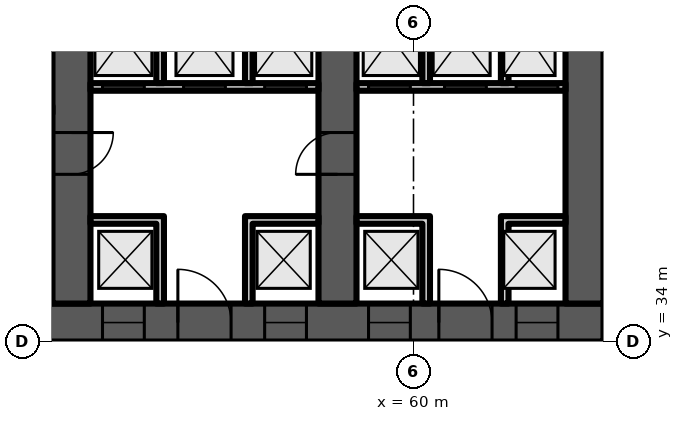
"""IFC4 building model, lengths in metres.
Left out: names, types, materials, properties, quantities, classifications, styles, units other than length and angle.
Written with IfcOpenShell. Run it as: python <this file> out.ifc"""

import sys

from ifc_helpers import new_model, si_unit, direction, frame, frame_2d, origin, place, context, subcontext, project, spatial, polyline, rectangle, outline, extrude, element, fill, save


model = new_model("IFC4")
c1 = context("Model", 3, precision=1e-05, world=origin(), true_north=direction((0.0, 1.0)))
c2 = subcontext(c1, "Body", "Model", "MODEL_VIEW")
j1 = project(units=[si_unit("LENGTHUNIT", "METRE"), si_unit("PLANEANGLEUNIT", "RADIAN")], contexts=[c1])
p1 = place(None, origin())
s1 = spatial("IfcSite", under=j1, at=p1, CompositionType="ELEMENT")
p2 = place(p1, origin())
s2 = spatial("IfcBuilding", under=s1, at=p2, CompositionType="ELEMENT")
p3 = place(p2, frame((0.0, 0.0, 147.1)))
s3 = spatial("IfcBuildingStorey", under=s2, at=p3, CompositionType="ELEMENT", Elevation=147.1)
p4 = place(p3, frame((16.0, 34.5, 0.0), z_axis=(0.0, 0.0, 1.0), x_axis=(1.0, 0.0, 0.0)))
e1 = element("IfcWall", 1, at=p4, inside=s3, PredefinedType="SHEAR", context=c2, shape_type="SweptSolid", body=[
    extrude(rectangle(XDim=49.0, YDim=1.0, at=frame_2d((24.5, 0.0))), origin(), (0.0, 0.0, 1.0), 4.8),
])
p5 = place(p4, frame((1.2, 0.0, 0.0)))
e2 = element("IfcOpeningElement", 2, at=p5, cuts=e1, PredefinedType="OPENING", context=c2, shape_type="SweptSolid", body=[
    extrude(rectangle(XDim=1.1, YDim=2.1, at=frame_2d((0.55, 1.05))), frame((0.0, 0.51, 0.0), z_axis=(0.0, -1.0, 0.0), x_axis=(1.0, 0.0, 0.0)), (0.0, 0.0, 1.0), 1.02),
])
p6 = place(p4, frame((5.083, 0.0, 0.0)))
e3 = element("IfcOpeningElement", 3, at=p6, cuts=e1, PredefinedType="OPENING", context=c2, shape_type="SweptSolid", body=[
    extrude(rectangle(XDim=1.1, YDim=2.1, at=frame_2d((0.55, 1.05))), frame((0.0, 0.51, 0.0), z_axis=(0.0, -1.0, 0.0), x_axis=(1.0, 0.0, 0.0)), (0.0, 0.0, 1.0), 1.02),
])
p7 = place(p4, frame((2.933, 0.0, 0.0)))
e4 = element("IfcOpeningElement", 4, at=p7, cuts=e1, PredefinedType="OPENING", context=c2, shape_type="SweptSolid", body=[
    extrude(rectangle(XDim=1.4, YDim=2.1, at=frame_2d((0.7, 1.05))), frame((0.0, 0.51, 0.0), z_axis=(0.0, -1.0, 0.0), x_axis=(1.0, 0.0, 0.0)), (0.0, 0.0, 1.0), 1.02),
])
p8 = place(p4, frame((7.65, 0.0, 0.0)))
e5 = element("IfcOpeningElement", 5, at=p8, cuts=e1, PredefinedType="OPENING", context=c2, shape_type="SweptSolid", body=[
    extrude(rectangle(XDim=1.2, YDim=2.1, at=frame_2d((0.6, 1.05))), frame((0.0, 0.51, 0.0), z_axis=(0.0, -1.0, 0.0), x_axis=(1.0, 0.0, 0.0)), (0.0, 0.0, 1.0), 1.02),
])
p9 = place(p4, frame((14.817, 0.0, 0.0)))
e6 = element("IfcOpeningElement", 6, at=p9, cuts=e1, PredefinedType="OPENING", context=c2, shape_type="SweptSolid", body=[
    extrude(rectangle(XDim=1.1, YDim=2.1, at=frame_2d((0.55, 1.05))), frame((0.0, 0.51, 0.0), z_axis=(0.0, -1.0, 0.0), x_axis=(1.0, 0.0, 0.0)), (0.0, 0.0, 1.0), 1.02),
])
p10 = place(p4, frame((19.083, 0.0, 0.0)))
e7 = element("IfcOpeningElement", 7, at=p10, cuts=e1, PredefinedType="OPENING", context=c2, shape_type="SweptSolid", body=[
    extrude(rectangle(XDim=1.1, YDim=2.1, at=frame_2d((0.55, 1.05))), frame((0.0, 0.51, 0.0), z_axis=(0.0, -1.0, 0.0), x_axis=(1.0, 0.0, 0.0)), (0.0, 0.0, 1.0), 1.02),
])
p11 = place(p4, frame((16.8, 0.0, 0.0)))
e8 = element("IfcOpeningElement", 8, at=p11, cuts=e1, PredefinedType="OPENING", context=c2, shape_type="SweptSolid", body=[
    extrude(rectangle(XDim=1.4, YDim=2.1, at=frame_2d((0.7, 1.05))), frame((0.0, 0.51, 0.0), z_axis=(0.0, -1.0, 0.0), x_axis=(1.0, 0.0, 0.0)), (0.0, 0.0, 1.0), 1.02),
])
p12 = place(p4, frame((21.817, 0.0, 0.0)))
e9 = element("IfcOpeningElement", 9, at=p12, cuts=e1, PredefinedType="OPENING", context=c2, shape_type="SweptSolid", body=[
    extrude(rectangle(XDim=1.1, YDim=2.1, at=frame_2d((0.55, 1.05))), frame((0.0, 0.51, 0.0), z_axis=(0.0, -1.0, 0.0), x_axis=(1.0, 0.0, 0.0)), (0.0, 0.0, 1.0), 1.02),
])
p13 = place(p4, frame((23.95, 0.0, 0.0)))
e10 = element("IfcOpeningElement", 10, at=p13, cuts=e1, PredefinedType="OPENING", context=c2, shape_type="SweptSolid", body=[
    extrude(rectangle(XDim=1.1, YDim=2.1, at=frame_2d((0.55, 1.05))), frame((0.0, 0.51, 0.0), z_axis=(0.0, -1.0, 0.0), x_axis=(1.0, 0.0, 0.0)), (0.0, 0.0, 1.0), 1.02),
])
p14 = place(p4, frame((26.083, 0.0, 0.0)))
e11 = element("IfcOpeningElement", 11, at=p14, cuts=e1, PredefinedType="OPENING", context=c2, shape_type="SweptSolid", body=[
    extrude(rectangle(XDim=1.1, YDim=2.1, at=frame_2d((0.55, 1.05))), frame((0.0, 0.51, 0.0), z_axis=(0.0, -1.0, 0.0), x_axis=(1.0, 0.0, 0.0)), (0.0, 0.0, 1.0), 1.02),
])
p15 = place(p4, frame((33.15, 0.0, 0.0)))
e12 = element("IfcOpeningElement", 12, at=p15, cuts=e1, PredefinedType="OPENING", context=c2, shape_type="SweptSolid", body=[
    extrude(rectangle(XDim=1.2, YDim=2.1, at=frame_2d((0.6, 1.05))), frame((0.0, 0.51, 0.0), z_axis=(0.0, -1.0, 0.0), x_axis=(1.0, 0.0, 0.0)), (0.0, 0.0, 1.0), 1.02),
])
p16 = place(p4, frame((35.817, 0.0, 0.0)))
e13 = element("IfcOpeningElement", 13, at=p16, cuts=e1, PredefinedType="OPENING", context=c2, shape_type="SweptSolid", body=[
    extrude(rectangle(XDim=1.1, YDim=2.1, at=frame_2d((0.55, 1.05))), frame((0.0, 0.51, 0.0), z_axis=(0.0, -1.0, 0.0), x_axis=(1.0, 0.0, 0.0)), (0.0, 0.0, 1.0), 1.02),
])
p17 = place(p4, frame((40.083, 0.0, 0.0)))
e14 = element("IfcOpeningElement", 14, at=p17, cuts=e1, PredefinedType="OPENING", context=c2, shape_type="SweptSolid", body=[
    extrude(rectangle(XDim=1.1, YDim=2.1, at=frame_2d((0.55, 1.05))), frame((0.0, 0.51, 0.0), z_axis=(0.0, -1.0, 0.0), x_axis=(1.0, 0.0, 0.0)), (0.0, 0.0, 1.0), 1.02),
])
p18 = place(p4, frame((37.8, 0.0, 0.0)))
e15 = element("IfcOpeningElement", 15, at=p18, cuts=e1, PredefinedType="OPENING", context=c2, shape_type="SweptSolid", body=[
    extrude(rectangle(XDim=1.4, YDim=2.1, at=frame_2d((0.7, 1.05))), frame((0.0, 0.51, 0.0), z_axis=(0.0, -1.0, 0.0), x_axis=(1.0, 0.0, 0.0)), (0.0, 0.0, 1.0), 1.02),
])
p19 = place(p4, frame((42.817, 0.0, 0.0)))
e16 = element("IfcOpeningElement", 16, at=p19, cuts=e1, PredefinedType="OPENING", context=c2, shape_type="SweptSolid", body=[
    extrude(rectangle(XDim=1.1, YDim=2.1, at=frame_2d((0.55, 1.05))), frame((0.0, 0.51, 0.0), z_axis=(0.0, -1.0, 0.0), x_axis=(1.0, 0.0, 0.0)), (0.0, 0.0, 1.0), 1.02),
])
p20 = place(p4, frame((46.7, 0.0, 0.0)))
e17 = element("IfcOpeningElement", 17, at=p20, cuts=e1, PredefinedType="OPENING", context=c2, shape_type="SweptSolid", body=[
    extrude(rectangle(XDim=1.1, YDim=2.1, at=frame_2d((0.55, 1.05))), frame((0.0, 0.51, 0.0), z_axis=(0.0, -1.0, 0.0), x_axis=(1.0, 0.0, 0.0)), (0.0, 0.0, 1.0), 1.02),
])
p21 = place(p4, frame((44.667, 0.0, 0.0)))
e18 = element("IfcOpeningElement", 18, at=p21, cuts=e1, PredefinedType="OPENING", context=c2, shape_type="SweptSolid", body=[
    extrude(rectangle(XDim=1.4, YDim=2.1, at=frame_2d((0.7, 1.05))), frame((0.0, 0.51, 0.0), z_axis=(0.0, -1.0, 0.0), x_axis=(1.0, 0.0, 0.0)), (0.0, 0.0, 1.0), 1.02),
])
p22 = place(p3, frame((51.0, 35.0, 0.0), z_axis=(0.0, 0.0, 1.0), x_axis=(0.0, 1.0, 0.0)))
e19 = element("IfcWall", 19, at=p22, inside=s3, PredefinedType="SHEAR", context=c2, shape_type="SweptSolid", body=[
    extrude(rectangle(XDim=13.965, YDim=1.0, at=frame_2d((6.982, 0.0))), origin(), (0.0, 0.0, 1.0), 4.8),
])
p23 = place(p22, frame((3.4, 0.0, 0.0)))
e20 = element("IfcOpeningElement", 20, at=p23, cuts=e19, PredefinedType="OPENING", context=c2, shape_type="SweptSolid", body=[
    extrude(rectangle(XDim=1.1, YDim=2.1, at=frame_2d((0.55, 1.05))), frame((0.0, 0.51, 0.0), z_axis=(0.0, -1.0, 0.0), x_axis=(1.0, 0.0, 0.0)), (0.0, 0.0, 1.0), 1.02),
])
p24 = place(p3, frame((58.0, 35.0, 0.0), z_axis=(0.0, 0.0, 1.0), x_axis=(0.0, 1.0, 0.0)))
e21 = element("IfcWall", 21, at=p24, inside=s3, PredefinedType="SHEAR", context=c2, shape_type="SweptSolid", body=[
    extrude(rectangle(XDim=13.352, YDim=1.0, at=frame_2d((6.676, 0.0))), origin(), (0.0, 0.0, 1.0), 4.8),
])
p25 = place(p24, frame((10.71, 0.0, 0.0)))
e22 = element("IfcOpeningElement", 22, at=p25, cuts=e21, PredefinedType="OPENING", context=c2, shape_type="SweptSolid", body=[
    extrude(rectangle(XDim=1.0, YDim=2.1, at=frame_2d((0.5, 1.05))), frame((0.0, 0.51, 0.0), z_axis=(0.0, -1.0, 0.0), x_axis=(1.0, 0.0, 0.0)), (0.0, 0.0, 1.0), 1.02),
])
p26 = place(p24, frame((3.4, 0.0, 0.0)))
e23 = element("IfcOpeningElement", 23, at=p26, cuts=e21, PredefinedType="OPENING", context=c2, shape_type="SweptSolid", body=[
    extrude(rectangle(XDim=1.1, YDim=2.1, at=frame_2d((0.55, 1.05))), frame((0.0, 0.51, 0.0), z_axis=(0.0, -1.0, 0.0), x_axis=(1.0, 0.0, 0.0)), (0.0, 0.0, 1.0), 1.02),
])
p27 = place(p3, frame((64.5, 35.0, 0.0), z_axis=(0.0, 0.0, 1.0), x_axis=(0.0, 1.0, 0.0)))
e24 = element("IfcWall", 24, at=p27, inside=s3, PredefinedType="SHEAR", context=c2, shape_type="SweptSolid", body=[
    extrude(rectangle(XDim=12.784, YDim=1.0, at=frame_2d((6.392, 0.0))), origin(), (0.0, 0.0, 1.0), 4.8),
])
p28 = place(p27, frame((10.426, 0.0, 0.0)))
e25 = element("IfcOpeningElement", 25, at=p28, cuts=e24, PredefinedType="OPENING", context=c2, shape_type="SweptSolid", body=[
    extrude(rectangle(XDim=1.0, YDim=2.1, at=frame_2d((0.5, 1.05))), frame((0.0, 0.51, 0.0), z_axis=(0.0, -1.0, 0.0), x_axis=(1.0, 0.0, 0.0)), (0.0, 0.0, 1.0), 1.02),
])
p29 = place(p3, frame((51.5, 40.7, 0.0), z_axis=(0.0, 0.0, 1.0), x_axis=(1.0, 0.0, 0.0)))
e26 = element("IfcWall", 26, at=p29, inside=s3, PredefinedType="PARTITIONING", context=c2, shape_type="SweptSolid", body=[
    extrude(rectangle(XDim=6.0, YDim=0.2, at=frame_2d((3.0, 0.0))), origin(), (0.0, 0.0, 1.0), 4.4),
])
p30 = place(p29, frame((0.317, 0.0, 0.0)))
e27 = element("IfcOpeningElement", 27, at=p30, cuts=e26, PredefinedType="OPENING", context=c2, shape_type="SweptSolid", body=[
    extrude(rectangle(XDim=1.1, YDim=2.1, at=frame_2d((0.55, 1.05))), frame((0.0, 0.11, 0.0), z_axis=(0.0, -1.0, 0.0), x_axis=(1.0, 0.0, 0.0)), (0.0, 0.0, 1.0), 0.22),
])
p31 = place(p29, frame((2.45, 0.0, 0.0)))
e28 = element("IfcOpeningElement", 28, at=p31, cuts=e26, PredefinedType="OPENING", context=c2, shape_type="SweptSolid", body=[
    extrude(rectangle(XDim=1.1, YDim=2.1, at=frame_2d((0.55, 1.05))), frame((0.0, 0.11, 0.0), z_axis=(0.0, -1.0, 0.0), x_axis=(1.0, 0.0, 0.0)), (0.0, 0.0, 1.0), 0.22),
])
p32 = place(p29, frame((4.583, 0.0, 0.0)))
e29 = element("IfcOpeningElement", 29, at=p32, cuts=e26, PredefinedType="OPENING", context=c2, shape_type="SweptSolid", body=[
    extrude(rectangle(XDim=1.1, YDim=2.1, at=frame_2d((0.55, 1.05))), frame((0.0, 0.11, 0.0), z_axis=(0.0, -1.0, 0.0), x_axis=(1.0, 0.0, 0.0)), (0.0, 0.0, 1.0), 0.22),
])
p33 = place(p3, frame((0.0, 0.0, -0.0)))
e30 = element("IfcWall", 30, at=p33, inside=s3, PredefinedType="PARTITIONING", context=c2, shape_type="SweptSolid", body=[
    extrude(outline(polyline([(53.233, 37.1), (51.5, 37.1), (51.5, 37.3), (53.233, 37.3), (53.433, 37.3), (53.433, 35.0), (53.233, 35.0), (53.233, 37.1)])), origin(), (0.0, 0.0, 1.0), 4.4),
])
p34 = place(p3, frame((0.0, 0.0, -0.0)))
e31 = element("IfcWall", 31, at=p34, inside=s3, PredefinedType="PARTITIONING", context=c2, shape_type="SweptSolid", body=[
    extrude(outline(polyline([(55.567, 37.3), (55.767, 37.3), (57.5, 37.3), (57.5, 37.1), (55.767, 37.1), (55.767, 35.0), (55.567, 35.0), (55.567, 37.3)])), origin(), (0.0, 0.0, 1.0), 4.4),
])
p35 = place(p3, frame((0.0, 0.0, -0.0)))
e32 = element("IfcWall", 32, at=p35, inside=s3, PredefinedType="PARTITIONING", context=c2, shape_type="SweptSolid", body=[
    extrude(outline(polyline([(53.433, 40.8), (53.233, 40.8), (53.233, 43.8), (51.5, 43.8), (51.5, 44.0), (57.5, 44.0), (57.5, 43.8), (55.767, 43.8), (55.767, 40.8), (55.567, 40.8), (55.567, 43.8), (53.433, 43.8), (53.433, 40.8)])), origin(), (0.0, 0.0, 1.0), 4.4),
])
p36 = place(p3, frame((58.5, 40.7, 0.0), z_axis=(0.0, 0.0, 1.0), x_axis=(1.0, 0.0, 0.0)))
e33 = element("IfcWall", 33, at=p36, inside=s3, PredefinedType="PARTITIONING", context=c2, shape_type="SweptSolid", body=[
    extrude(rectangle(XDim=5.5, YDim=0.2, at=frame_2d((2.75, 0.0))), origin(), (0.0, 0.0, 1.0), 4.4),
])
p37 = place(p36, frame((0.317, 0.0, 0.0)))
e34 = element("IfcOpeningElement", 34, at=p37, cuts=e33, PredefinedType="OPENING", context=c2, shape_type="SweptSolid", body=[
    extrude(rectangle(XDim=1.1, YDim=2.1, at=frame_2d((0.55, 1.05))), frame((0.0, 0.11, 0.0), z_axis=(0.0, -1.0, 0.0), x_axis=(1.0, 0.0, 0.0)), (0.0, 0.0, 1.0), 0.22),
])
p38 = place(p36, frame((2.317, 0.0, 0.0)))
e35 = element("IfcOpeningElement", 35, at=p38, cuts=e33, PredefinedType="OPENING", context=c2, shape_type="SweptSolid", body=[
    extrude(rectangle(XDim=1.1, YDim=2.1, at=frame_2d((0.55, 1.05))), frame((0.0, 0.11, 0.0), z_axis=(0.0, -1.0, 0.0), x_axis=(1.0, 0.0, 0.0)), (0.0, 0.0, 1.0), 0.22),
])
p39 = place(p36, frame((4.2, 0.0, 0.0)))
e36 = element("IfcOpeningElement", 36, at=p39, cuts=e33, PredefinedType="OPENING", context=c2, shape_type="SweptSolid", body=[
    extrude(rectangle(XDim=1.1, YDim=2.1, at=frame_2d((0.55, 1.05))), frame((0.0, 0.11, 0.0), z_axis=(0.0, -1.0, 0.0), x_axis=(1.0, 0.0, 0.0)), (0.0, 0.0, 1.0), 0.22),
])
p40 = place(p3, frame((0.0, 0.0, -0.0)))
e37 = element("IfcWall", 37, at=p40, inside=s3, PredefinedType="PARTITIONING", context=c2, shape_type="SweptSolid", body=[
    extrude(outline(polyline([(60.233, 37.1), (58.5, 37.1), (58.5, 37.3), (60.233, 37.3), (60.433, 37.3), (60.433, 35.0), (60.233, 35.0), (60.233, 37.1)])), origin(), (0.0, 0.0, 1.0), 4.4),
])
p41 = place(p3, frame((0.0, 0.0, -0.0)))
e38 = element("IfcWall", 38, at=p41, inside=s3, PredefinedType="PARTITIONING", context=c2, shape_type="SweptSolid", body=[
    extrude(outline(polyline([(62.3, 37.3), (62.5, 37.3), (64.0, 37.3), (64.0, 37.1), (62.5, 37.1), (62.5, 35.0), (62.3, 35.0), (62.3, 37.3)])), origin(), (0.0, 0.0, 1.0), 4.4),
])
p42 = place(p3, frame((0.0, 0.0, -0.0)))
e39 = element("IfcWall", 39, at=p42, inside=s3, PredefinedType="PARTITIONING", context=c2, shape_type="SweptSolid", body=[
    extrude(outline(polyline([(60.433, 40.8), (60.233, 40.8), (60.233, 43.8), (58.5, 43.8), (58.5, 44.0), (64.0, 44.0), (64.0, 43.8), (62.5, 43.8), (62.5, 40.8), (62.3, 40.8), (62.3, 43.8), (60.433, 43.8), (60.433, 40.8)])), origin(), (0.0, 0.0, 1.0), 4.4),
])
p43 = place(p16, origin())
e40 = element("IfcDoor", 40, at=p43, inside=s3, OperationType="DOUBLE_DOOR_SLIDING", PredefinedType="DOOR", context=c2, shape_type="SweptSolid", body=[
    extrude(rectangle(XDim=1.1, YDim=2.1, at=frame_2d((0.55, 1.05))), frame((0.0, 0.025, 0.0), z_axis=(0.0, -1.0, 0.0), x_axis=(1.0, 0.0, 0.0)), (0.0, 0.0, 1.0), 0.05),
])
fill(e13, e40)
p44 = place(p17, origin())
e41 = element("IfcDoor", 41, at=p44, inside=s3, OperationType="DOUBLE_DOOR_SLIDING", PredefinedType="DOOR", context=c2, shape_type="SweptSolid", body=[
    extrude(rectangle(XDim=1.1, YDim=2.1, at=frame_2d((0.55, 1.05))), frame((0.0, 0.025, 0.0), z_axis=(0.0, -1.0, 0.0), x_axis=(1.0, 0.0, 0.0)), (0.0, 0.0, 1.0), 0.05),
])
fill(e14, e41)
p45 = place(p18, origin())
e42 = element("IfcDoor", 42, at=p45, inside=s3, OperationType="DOUBLE_DOOR_SINGLE_SWING", PredefinedType="DOOR", context=c2, shape_type="SweptSolid", body=[
    extrude(rectangle(XDim=1.4, YDim=2.1, at=frame_2d((0.7, 1.05))), frame((0.0, 0.025, 0.0), z_axis=(0.0, -1.0, 0.0), x_axis=(1.0, 0.0, 0.0)), (0.0, 0.0, 1.0), 0.05),
])
fill(e15, e42)
p46 = place(p30, origin())
e43 = element("IfcDoor", 43, at=p46, inside=s3, OperationType="DOUBLE_DOOR_SLIDING", PredefinedType="DOOR", context=c2, shape_type="SweptSolid", body=[
    extrude(rectangle(XDim=1.1, YDim=2.1, at=frame_2d((0.55, 1.05))), frame((0.0, 0.025, 0.0), z_axis=(0.0, -1.0, 0.0), x_axis=(1.0, 0.0, 0.0)), (0.0, 0.0, 1.0), 0.05),
])
fill(e27, e43)
p47 = place(p31, origin())
e44 = element("IfcDoor", 44, at=p47, inside=s3, OperationType="DOUBLE_DOOR_SLIDING", PredefinedType="DOOR", context=c2, shape_type="SweptSolid", body=[
    extrude(rectangle(XDim=1.1, YDim=2.1, at=frame_2d((0.55, 1.05))), frame((0.0, 0.025, 0.0), z_axis=(0.0, -1.0, 0.0), x_axis=(1.0, 0.0, 0.0)), (0.0, 0.0, 1.0), 0.05),
])
fill(e28, e44)
p48 = place(p32, origin())
e45 = element("IfcDoor", 45, at=p48, inside=s3, OperationType="DOUBLE_DOOR_SLIDING", PredefinedType="DOOR", context=c2, shape_type="SweptSolid", body=[
    extrude(rectangle(XDim=1.1, YDim=2.1, at=frame_2d((0.55, 1.05))), frame((0.0, 0.025, 0.0), z_axis=(0.0, -1.0, 0.0), x_axis=(1.0, 0.0, 0.0)), (0.0, 0.0, 1.0), 0.05),
])
fill(e29, e45)
p49 = place(p19, origin())
e46 = element("IfcDoor", 46, at=p49, inside=s3, OperationType="DOUBLE_DOOR_SLIDING", PredefinedType="DOOR", context=c2, shape_type="SweptSolid", body=[
    extrude(rectangle(XDim=1.1, YDim=2.1, at=frame_2d((0.55, 1.05))), frame((0.0, 0.025, 0.0), z_axis=(0.0, -1.0, 0.0), x_axis=(1.0, 0.0, 0.0)), (0.0, 0.0, 1.0), 0.05),
])
fill(e16, e46)
p50 = place(p20, origin())
e47 = element("IfcDoor", 47, at=p50, inside=s3, OperationType="DOUBLE_DOOR_SLIDING", PredefinedType="DOOR", context=c2, shape_type="SweptSolid", body=[
    extrude(rectangle(XDim=1.1, YDim=2.1, at=frame_2d((0.55, 1.05))), frame((0.0, 0.025, 0.0), z_axis=(0.0, -1.0, 0.0), x_axis=(1.0, 0.0, 0.0)), (0.0, 0.0, 1.0), 0.05),
])
fill(e17, e47)
p51 = place(p21, origin())
e48 = element("IfcDoor", 48, at=p51, inside=s3, OperationType="DOUBLE_DOOR_SINGLE_SWING", PredefinedType="DOOR", context=c2, shape_type="SweptSolid", body=[
    extrude(rectangle(XDim=1.4, YDim=2.1, at=frame_2d((0.7, 1.05))), frame((0.0, 0.025, 0.0), z_axis=(0.0, -1.0, 0.0), x_axis=(1.0, 0.0, 0.0)), (0.0, 0.0, 1.0), 0.05),
])
fill(e18, e48)
p52 = place(p37, origin())
e49 = element("IfcDoor", 49, at=p52, inside=s3, OperationType="DOUBLE_DOOR_SLIDING", PredefinedType="DOOR", context=c2, shape_type="SweptSolid", body=[
    extrude(rectangle(XDim=1.1, YDim=2.1, at=frame_2d((0.55, 1.05))), frame((0.0, 0.025, 0.0), z_axis=(0.0, -1.0, 0.0), x_axis=(1.0, 0.0, 0.0)), (0.0, 0.0, 1.0), 0.05),
])
fill(e34, e49)
p53 = place(p38, origin())
e50 = element("IfcDoor", 50, at=p53, inside=s3, OperationType="DOUBLE_DOOR_SLIDING", PredefinedType="DOOR", context=c2, shape_type="SweptSolid", body=[
    extrude(rectangle(XDim=1.1, YDim=2.1, at=frame_2d((0.55, 1.05))), frame((0.0, 0.025, 0.0), z_axis=(0.0, -1.0, 0.0), x_axis=(1.0, 0.0, 0.0)), (0.0, 0.0, 1.0), 0.05),
])
fill(e35, e50)
p54 = place(p39, origin())
e51 = element("IfcDoor", 51, at=p54, inside=s3, OperationType="DOUBLE_DOOR_SLIDING", PredefinedType="DOOR", context=c2, shape_type="SweptSolid", body=[
    extrude(rectangle(XDim=1.1, YDim=2.1, at=frame_2d((0.55, 1.05))), frame((0.0, 0.025, 0.0), z_axis=(0.0, -1.0, 0.0), x_axis=(1.0, 0.0, 0.0)), (0.0, 0.0, 1.0), 0.05),
])
fill(e36, e51)
p55 = place(p23, origin())
e52 = element("IfcDoor", 52, at=p55, inside=s3, OperationType="SINGLE_SWING_RIGHT", PredefinedType="DOOR", context=c2, shape_type="SweptSolid", body=[
    extrude(rectangle(XDim=1.1, YDim=2.1, at=frame_2d((0.55, 1.05))), frame((0.0, 0.025, 0.0), z_axis=(0.0, -1.0, 0.0), x_axis=(1.0, 0.0, 0.0)), (0.0, 0.0, 1.0), 0.05),
])
fill(e20, e52)
p56 = place(p26, origin())
e53 = element("IfcDoor", 53, at=p56, inside=s3, OperationType="SINGLE_SWING_LEFT", PredefinedType="DOOR", context=c2, shape_type="SweptSolid", body=[
    extrude(rectangle(XDim=1.1, YDim=2.1, at=frame_2d((0.55, 1.05))), frame((0.0, 0.025, 0.0), z_axis=(0.0, -1.0, 0.0), x_axis=(1.0, 0.0, 0.0)), (0.0, 0.0, 1.0), 0.05),
])
fill(e23, e53)
save(model, sys.argv[1])
